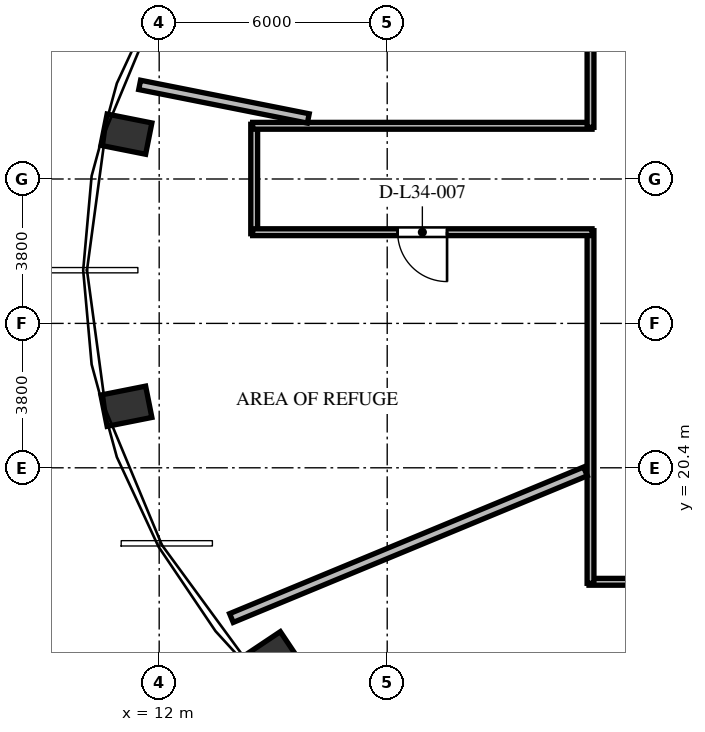
"""IFC4 building model, lengths in metres.
Left out: names, types, materials, properties, quantities, classifications, styles, units other than length and angle.
Written with IfcOpenShell. Run it as: python <this file> out.ifc"""

import sys

from ifc_helpers import new_model, si_unit, direction, frame, frame_2d, origin, origin_2d, place, context, subcontext, project, spatial, rectangle, extrude, element, fill, save


model = new_model("IFC4")
c1 = context("Model", 3, precision=1e-05, world=origin(), true_north=direction((0.0, 1.0)))
c2 = subcontext(c1, "Body", "Model", "MODEL_VIEW")
j1 = project(units=[si_unit("LENGTHUNIT", "METRE"), si_unit("PLANEANGLEUNIT", "RADIAN")], contexts=[c1])
p1 = place(None, origin())
s1 = spatial("IfcSite", under=j1, at=p1, CompositionType="ELEMENT")
p2 = place(p1, origin())
s2 = spatial("IfcBuilding", under=s1, at=p2, CompositionType="ELEMENT")
p3 = place(p2, frame((0.0, 0.0, 132.816)))
s3 = spatial("IfcBuildingStorey", under=s2, at=p3, CompositionType="ELEMENT", Elevation=132.816)
for number, where, z_axis, x_axis in (
    (1, (11.137, 29.18, 0.0), (0.0, 0.0, 1.0), (-0.981, 0.195, 0.0)),
    (2, (11.137, 22.02, 0.0), (0.0, 0.0, 1.0), (-0.981, -0.195, 0.0)),
    (3, (14.922, 15.405, 0.0), (0.0, 0.0, 1.0), (-0.831, -0.556, 0.0)),
):
    element("IfcColumn", number, at=place(p3, frame(where, z_axis=z_axis, x_axis=x_axis)), inside=s3, PredefinedType="COLUMN", context=c2, shape_type="SweptSolid", body=[
        extrude(rectangle(XDim=1.2, YDim=0.84, at=origin_2d()), origin(), (0.0, 0.0, 1.0), 5.472),
    ])
p4 = place(p3, frame((14.5, 26.56, 0.0), z_axis=(0.0, 0.0, 1.0), x_axis=(0.0, 1.0, 0.0)))
e4 = element("IfcWall", 4, at=p4, inside=s3, PredefinedType="PARTITIONING", context=c2, shape_type="SweptSolid", body=[
    extrude(rectangle(XDim=2.88, YDim=0.18, at=frame_2d((1.44, 0.0))), origin(), (0.0, 0.0, 1.0), 5.022),
])
p5 = place(p3, frame((14.46, 29.4, 0.0), z_axis=(0.0, 0.0, 1.0), x_axis=(1.0, 0.0, 0.0)))
e5 = element("IfcWall", 5, at=p5, inside=s3, PredefinedType="PARTITIONING", context=c2, shape_type="SweptSolid", body=[
    extrude(rectangle(XDim=8.93, YDim=0.18, at=frame_2d((4.465, 0.0))), origin(), (0.0, 0.0, 1.0), 5.022),
])
p6 = place(p3, frame((23.35, 29.36, 0.0), z_axis=(0.0, 0.0, 1.0), x_axis=(0.0, 1.0, 0.0)))
e6 = element("IfcWall", 6, at=p6, inside=s3, PredefinedType="PARTITIONING", context=c2, shape_type="SweptSolid", body=[
    extrude(rectangle(XDim=9.43, YDim=0.18, at=frame_2d((4.715, 0.0))), origin(), (0.0, 0.0, 1.0), 4.707),
])
p7 = place(p6, frame((3.968, 0.0, 0.0)))
e7 = element("IfcOpeningElement", 7, at=p7, cuts=e6, PredefinedType="OPENING", context=c2, shape_type="SweptSolid", body=[
    extrude(rectangle(XDim=1.3, YDim=2.2, at=frame_2d((0.65, 1.1))), frame((0.0, 0.1, 0.0), z_axis=(0.0, -1.0, 0.0), x_axis=(1.0, 0.0, 0.0)), (0.0, 0.0, 1.0), 0.2),
])
p8 = place(p3, frame((45.24, 17.4, 0.0), z_axis=(0.0, 0.0, 1.0), x_axis=(-1.0, 0.0, 0.0)))
e8 = element("IfcWall", 8, at=p8, inside=s3, PredefinedType="PARTITIONING", context=c2, shape_type="SweptSolid", body=[
    extrude(rectangle(XDim=21.93, YDim=0.18, at=frame_2d((10.965, 0.0))), origin(), (0.0, 0.0, 1.0), 4.647),
])
p9 = place(p8, frame((17.659, 0.0, 0.0)))
e9 = element("IfcOpeningElement", 9, at=p9, cuts=e8, PredefinedType="OPENING", context=c2, shape_type="SweptSolid", body=[
    extrude(rectangle(XDim=1.3, YDim=2.2, at=frame_2d((0.65, 1.1))), frame((0.0, 0.1, 0.0), z_axis=(0.0, -1.0, 0.0), x_axis=(1.0, 0.0, 0.0)), (0.0, 0.0, 1.0), 0.2),
])
p10 = place(p8, frame((13.035, 0.0, 0.0)))
e10 = element("IfcOpeningElement", 10, at=p10, cuts=e8, PredefinedType="OPENING", context=c2, shape_type="SweptSolid", body=[
    extrude(rectangle(XDim=1.1, YDim=2.15, at=frame_2d((0.55, 1.075))), frame((0.0, 0.1, 0.0), z_axis=(0.0, -1.0, 0.0), x_axis=(1.0, 0.0, 0.0)), (0.0, 0.0, 1.0), 0.2),
])
p11 = place(p8, frame((8.409, 0.0, 0.0)))
e11 = element("IfcOpeningElement", 11, at=p11, cuts=e8, PredefinedType="OPENING", context=c2, shape_type="SweptSolid", body=[
    extrude(rectangle(XDim=1.1, YDim=2.15, at=frame_2d((0.55, 1.075))), frame((0.0, 0.1, 0.0), z_axis=(0.0, -1.0, 0.0), x_axis=(1.0, 0.0, 0.0)), (0.0, 0.0, 1.0), 0.2),
])
p12 = place(p8, frame((2.831, 0.0, 0.0)))
e12 = element("IfcOpeningElement", 12, at=p12, cuts=e8, PredefinedType="OPENING", context=c2, shape_type="SweptSolid", body=[
    extrude(rectangle(XDim=1.3, YDim=2.2, at=frame_2d((0.65, 1.1))), frame((0.0, 0.1, 0.0), z_axis=(0.0, -1.0, 0.0), x_axis=(1.0, 0.0, 0.0)), (0.0, 0.0, 1.0), 0.2),
])
p13 = place(p3, frame((23.35, 17.36, 0.0), z_axis=(0.0, 0.0, 1.0), x_axis=(0.0, 1.0, 0.0)))
e13 = element("IfcWall", 13, at=p13, inside=s3, PredefinedType="PARTITIONING", context=c2, shape_type="SweptSolid", body=[
    extrude(rectangle(XDim=9.28, YDim=0.18, at=frame_2d((4.64, 0.0))), origin(), (0.0, 0.0, 1.0), 4.707),
])
p14 = place(p3, frame((23.39, 26.6, 0.0), z_axis=(0.0, 0.0, 1.0), x_axis=(-1.0, 0.0, 0.0)))
e14 = element("IfcWall", 14, at=p14, inside=s3, PredefinedType="PARTITIONING", context=c2, shape_type="SweptSolid", body=[
    extrude(rectangle(XDim=8.93, YDim=0.18, at=frame_2d((4.465, 0.0))), origin(), (0.0, 0.0, 1.0), 5.022),
])
p15 = place(p14, frame((3.815, 0.0, 0.0)))
e15 = element("IfcOpeningElement", 15, at=p15, cuts=e14, PredefinedType="OPENING", context=c2, shape_type="SweptSolid", body=[
    extrude(rectangle(XDim=1.3, YDim=2.2, at=frame_2d((0.65, 1.1))), frame((0.0, 0.1, 0.0), z_axis=(0.0, -1.0, 0.0), x_axis=(1.0, 0.0, 0.0)), (0.0, 0.0, 1.0), 0.2),
])
p16 = place(p3, frame((15.923, 29.594, 0.0), z_axis=(0.0, 0.0, 1.0), x_axis=(-0.98077940709, 0.195119846833, 0.0)))
e16 = element("IfcWall", 16, at=p16, inside=s3, PredefinedType="SOLIDWALL", context=c2, shape_type="SweptSolid", body=[
    extrude(rectangle(XDim=4.524, YDim=0.25, at=frame_2d((2.262, 0.0))), origin(), (0.0, 0.0, 1.0), 5.022),
])
p17 = place(p3, frame((23.217, 20.305, 0.0), z_axis=(0.0, 0.0, 1.0), x_axis=(-0.923880790032, -0.382680396427, 0.0)))
e17 = element("IfcWall", 17, at=p17, inside=s3, PredefinedType="SOLIDWALL", context=c2, shape_type="SweptSolid", body=[
    extrude(rectangle(XDim=10.083, YDim=0.25, at=frame_2d((5.042, 0.0))), origin(), (0.0, 0.0, 1.0), 5.022),
])
p18 = place(p3, frame((29.467, 17.239, 0.0), z_axis=(0.0, 0.0, 1.0), x_axis=(-0.615661890961, -0.788010428877, 0.0)))
e18 = element("IfcWall", 18, at=p18, inside=s3, PredefinedType="SOLIDWALL", context=c2, shape_type="SweptSolid", body=[
    extrude(rectangle(XDim=9.821, YDim=0.25, at=frame_2d((4.911, 0.0))), origin(), (0.0, 0.0, 1.0), 5.022),
])
p19 = place(p15, origin())
e19 = element("IfcDoor", 19, at=p19, inside=s3, OperationType="SINGLE_SWING_LEFT", PredefinedType="DOOR", context=c2, shape_type="SweptSolid", body=[
    extrude(rectangle(XDim=1.3, YDim=2.2, at=frame_2d((0.65, 1.1))), frame((0.0, 0.025, 0.0), z_axis=(0.0, -1.0, 0.0), x_axis=(1.0, 0.0, 0.0)), (0.0, 0.0, 1.0), 0.05),
])
fill(e15, e19)
save(model, sys.argv[1])
